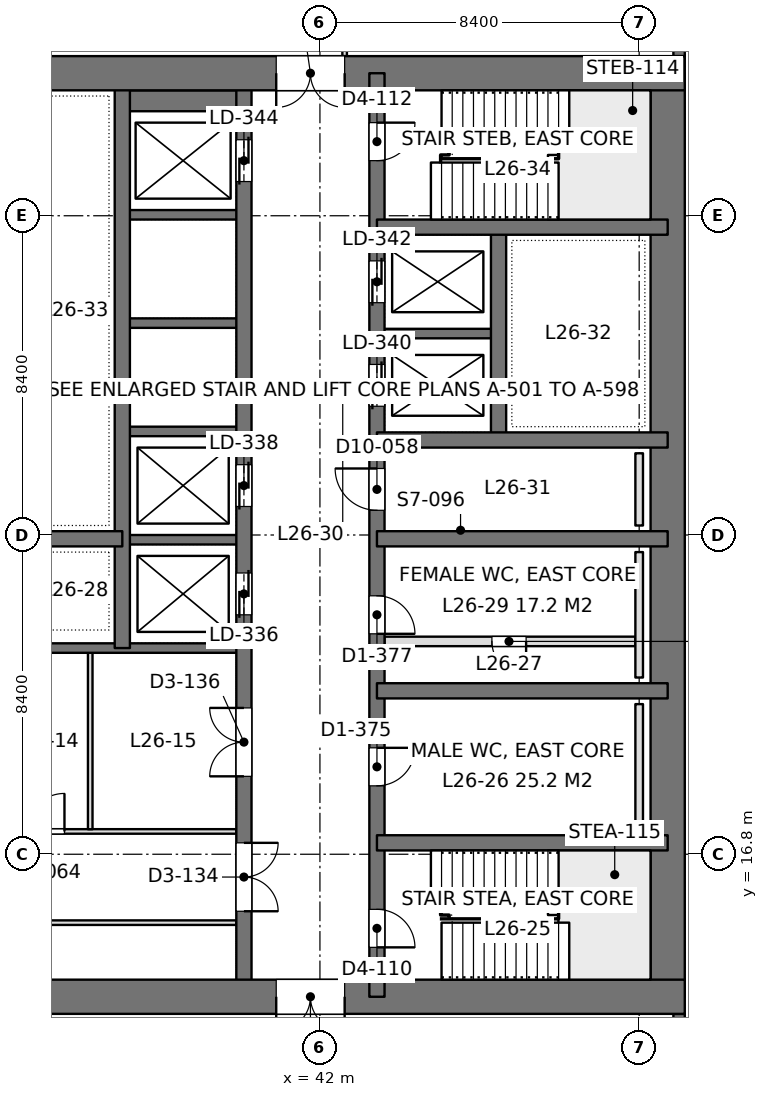
"""IFC4 building model, lengths in metres.
Left out: names, types, materials, properties, quantities, classifications, styles, units other than length and angle.
Written with IfcOpenShell. Run it as: python <this file> out.ifc"""

import sys

from ifc_helpers import new_model, si_unit, direction, frame, frame_2d, origin, place, context, subcontext, project, spatial, rectangle, extrude, element, fill, save


model = new_model("IFC4")
c1 = context("Model", 3, precision=1e-05, world=origin(), true_north=direction((0.0, 1.0)))
c2 = subcontext(c1, "Body", "Model", "MODEL_VIEW")
j1 = project(units=[si_unit("LENGTHUNIT", "METRE"), si_unit("PLANEANGLEUNIT", "RADIAN")], contexts=[c1])
p1 = place(None, origin())
s1 = spatial("IfcSite", under=j1, at=p1, CompositionType="ELEMENT")
p2 = place(p1, origin())
s2 = spatial("IfcBuilding", under=s1, at=p2, CompositionType="ELEMENT")
p3 = place(p2, frame((0.0, 0.0, 117.6)))
s3 = spatial("IfcBuildingStorey", under=s2, at=p3, CompositionType="ELEMENT", Elevation=117.6)
p4 = place(p3, frame((33.6, 13.05, 0.0), z_axis=(0.0, 0.0, 1.0), x_axis=(1.0, 0.0, 0.0)))
e1 = element("IfcWall", 1, at=p4, inside=s3, PredefinedType="SHEAR", context=c2, shape_type="SweptSolid", body=[
    extrude(rectangle(XDim=18.0, YDim=0.9, at=frame_2d((9.0, 0.0))), origin(), (0.0, 0.0, 1.0), 4.2),
])
p5 = place(p4, frame((7.25, 0.0, 0.0)))
e2 = element("IfcOpeningElement", 2, at=p5, cuts=e1, PredefinedType="OPENING", context=c2, shape_type="SweptSolid", body=[
    extrude(rectangle(XDim=1.8, YDim=2.4, at=frame_2d((0.9, 1.2))), frame((0.0, 0.46, 0.0), z_axis=(0.0, -1.0, 0.0), x_axis=(1.0, 0.0, 0.0)), (0.0, 0.0, 1.0), 0.92),
])
p6 = place(p3, frame((33.6, 37.35, 0.0), z_axis=(0.0, 0.0, 1.0), x_axis=(1.0, 0.0, 0.0)))
e3 = element("IfcWall", 3, at=p6, inside=s3, PredefinedType="SHEAR", context=c2, shape_type="SweptSolid", body=[
    extrude(rectangle(XDim=18.0, YDim=0.9, at=frame_2d((9.0, 0.0))), origin(), (0.0, 0.0, 1.0), 4.2),
])
p7 = place(p6, frame((7.25, 0.0, 0.0)))
e4 = element("IfcOpeningElement", 4, at=p7, cuts=e3, PredefinedType="OPENING", context=c2, shape_type="SweptSolid", body=[
    extrude(rectangle(XDim=1.8, YDim=2.4, at=frame_2d((0.9, 1.2))), frame((0.0, 0.46, 0.0), z_axis=(0.0, -1.0, 0.0), x_axis=(1.0, 0.0, 0.0)), (0.0, 0.0, 1.0), 0.92),
])
p8 = place(p3, frame((51.15, 13.05, 0.0), z_axis=(0.0, 0.0, 1.0), x_axis=(0.0, 1.0, 0.0)))
e5 = element("IfcWall", 5, at=p8, inside=s3, PredefinedType="SHEAR", context=c2, shape_type="SweptSolid", body=[
    extrude(rectangle(XDim=24.3, YDim=0.9, at=frame_2d((12.15, 0.0))), origin(), (0.0, 0.0, 1.0), 4.2),
])
p9 = place(p3, frame((43.5, 13.05, 0.0), z_axis=(0.0, 0.0, 1.0), x_axis=(0.0, 1.0, 0.0)))
e6 = element("IfcWall", 6, at=p9, inside=s3, PredefinedType="SHEAR", context=c2, shape_type="SweptSolid", body=[
    extrude(rectangle(XDim=24.3, YDim=0.4, at=frame_2d((12.15, 0.0))), origin(), (0.0, 0.0, 1.0), 4.2),
])
p10 = place(p9, frame((1.3, 0.0, 0.0)))
e7 = element("IfcOpeningElement", 7, at=p10, cuts=e6, PredefinedType="OPENING", context=c2, shape_type="SweptSolid", body=[
    extrude(rectangle(XDim=1.0, YDim=2.2, at=frame_2d((0.5, 1.1))), frame((0.0, 0.21, 0.0), z_axis=(0.0, -1.0, 0.0), x_axis=(1.0, 0.0, 0.0)), (0.0, 0.0, 1.0), 0.42),
])
p11 = place(p9, frame((22.0, 0.0, 0.0)))
e8 = element("IfcOpeningElement", 8, at=p11, cuts=e6, PredefinedType="OPENING", context=c2, shape_type="SweptSolid", body=[
    extrude(rectangle(XDim=1.0, YDim=2.2, at=frame_2d((0.5, 1.1))), frame((0.0, 0.21, 0.0), z_axis=(0.0, -1.0, 0.0), x_axis=(1.0, 0.0, 0.0)), (0.0, 0.0, 1.0), 0.42),
])
p12 = place(p9, frame((5.55, 0.0, 0.0)))
e9 = element("IfcOpeningElement", 9, at=p12, cuts=e6, PredefinedType="OPENING", context=c2, shape_type="SweptSolid", body=[
    extrude(rectangle(XDim=1.0, YDim=2.2, at=frame_2d((0.5, 1.1))), frame((0.0, 0.21, 0.0), z_axis=(0.0, -1.0, 0.0), x_axis=(1.0, 0.0, 0.0)), (0.0, 0.0, 1.0), 0.42),
])
p13 = place(p9, frame((9.55, 0.0, 0.0)))
e10 = element("IfcOpeningElement", 10, at=p13, cuts=e6, PredefinedType="OPENING", context=c2, shape_type="SweptSolid", body=[
    extrude(rectangle(XDim=1.0, YDim=2.2, at=frame_2d((0.5, 1.1))), frame((0.0, 0.21, 0.0), z_axis=(0.0, -1.0, 0.0), x_axis=(1.0, 0.0, 0.0)), (0.0, 0.0, 1.0), 0.42),
])
p14 = place(p9, frame((12.8, 0.0, 0.0)))
e11 = element("IfcOpeningElement", 11, at=p14, cuts=e6, PredefinedType="OPENING", context=c2, shape_type="SweptSolid", body=[
    extrude(rectangle(XDim=1.1, YDim=2.2, at=frame_2d((0.55, 1.1))), frame((0.0, 0.21, 0.0), z_axis=(0.0, -1.0, 0.0), x_axis=(1.0, 0.0, 0.0)), (0.0, 0.0, 1.0), 0.42),
])
p15 = place(p9, frame((15.538, 0.0, 0.0)))
e12 = element("IfcOpeningElement", 12, at=p15, cuts=e6, PredefinedType="OPENING", context=c2, shape_type="SweptSolid", body=[
    extrude(rectangle(XDim=1.1, YDim=2.2, at=frame_2d((0.55, 1.1))), frame((0.0, 0.21, 0.0), z_axis=(0.0, -1.0, 0.0), x_axis=(1.0, 0.0, 0.0)), (0.0, 0.0, 1.0), 0.42),
])
p16 = place(p9, frame((18.262, 0.0, 0.0)))
e13 = element("IfcOpeningElement", 13, at=p16, cuts=e6, PredefinedType="OPENING", context=c2, shape_type="SweptSolid", body=[
    extrude(rectangle(XDim=1.1, YDim=2.2, at=frame_2d((0.55, 1.1))), frame((0.0, 0.21, 0.0), z_axis=(0.0, -1.0, 0.0), x_axis=(1.0, 0.0, 0.0)), (0.0, 0.0, 1.0), 0.42),
])
p17 = place(p3, frame((40.0, 13.05, 0.0), z_axis=(0.0, 0.0, 1.0), x_axis=(0.0, 1.0, 0.0)))
e14 = element("IfcWall", 14, at=p17, inside=s3, PredefinedType="SHEAR", context=c2, shape_type="SweptSolid", body=[
    extrude(rectangle(XDim=24.3, YDim=0.4, at=frame_2d((12.15, 0.0))), origin(), (0.0, 0.0, 1.0), 4.2),
])
p18 = place(p17, frame((10.05, 0.0, 0.0)))
e15 = element("IfcOpeningElement", 15, at=p18, cuts=e14, PredefinedType="OPENING", context=c2, shape_type="SweptSolid", body=[
    extrude(rectangle(XDim=1.1, YDim=2.2, at=frame_2d((0.55, 1.1))), frame((0.0, 0.21, 0.0), z_axis=(0.0, -1.0, 0.0), x_axis=(1.0, 0.0, 0.0)), (0.0, 0.0, 1.0), 0.42),
])
p19 = place(p17, frame((12.9, 0.0, 0.0)))
e16 = element("IfcOpeningElement", 16, at=p19, cuts=e14, PredefinedType="OPENING", context=c2, shape_type="SweptSolid", body=[
    extrude(rectangle(XDim=1.1, YDim=2.2, at=frame_2d((0.55, 1.1))), frame((0.0, 0.21, 0.0), z_axis=(0.0, -1.0, 0.0), x_axis=(1.0, 0.0, 0.0)), (0.0, 0.0, 1.0), 0.42),
])
p20 = place(p17, frame((21.45, 0.0, 0.0)))
e17 = element("IfcOpeningElement", 17, at=p20, cuts=e14, PredefinedType="OPENING", context=c2, shape_type="SweptSolid", body=[
    extrude(rectangle(XDim=1.1, YDim=2.2, at=frame_2d((0.55, 1.1))), frame((0.0, 0.21, 0.0), z_axis=(0.0, -1.0, 0.0), x_axis=(1.0, 0.0, 0.0)), (0.0, 0.0, 1.0), 0.42),
])
p21 = place(p17, frame((2.25, 0.0, 0.0)))
e18 = element("IfcOpeningElement", 18, at=p21, cuts=e14, PredefinedType="OPENING", context=c2, shape_type="SweptSolid", body=[
    extrude(rectangle(XDim=1.8, YDim=2.4, at=frame_2d((0.9, 1.2))), frame((0.0, 0.21, 0.0), z_axis=(0.0, -1.0, 0.0), x_axis=(1.0, 0.0, 0.0)), (0.0, 0.0, 1.0), 0.42),
])
p22 = place(p17, frame((5.8, 0.0, 0.0)))
e19 = element("IfcOpeningElement", 19, at=p22, cuts=e14, PredefinedType="OPENING", context=c2, shape_type="SweptSolid", body=[
    extrude(rectangle(XDim=1.8, YDim=2.4, at=frame_2d((0.9, 1.2))), frame((0.0, 0.21, 0.0), z_axis=(0.0, -1.0, 0.0), x_axis=(1.0, 0.0, 0.0)), (0.0, 0.0, 1.0), 0.42),
])
p23 = place(p3, frame((36.8, 22.225, 0.0), z_axis=(0.0, 0.0, 1.0), x_axis=(0.0, 1.0, 0.0)))
e20 = element("IfcWall", 20, at=p23, inside=s3, PredefinedType="SHEAR", context=c2, shape_type="SweptSolid", body=[
    extrude(rectangle(XDim=15.125, YDim=0.4, at=frame_2d((7.562, 0.0))), origin(), (0.0, 0.0, 1.0), 4.2),
])
for number, where, z_axis, x_axis in (
    (21, (51.15, 17.1, 0.0), (0.0, 0.0, 1.0), (-1.0, 0.0, 0.0)),
    (22, (51.15, 21.1, 0.0), (0.0, 0.0, 1.0), (-1.0, 0.0, 0.0)),
    (23, (51.15, 25.1, 0.0), (0.0, 0.0, 1.0), (-1.0, 0.0, 0.0)),
    (24, (51.15, 27.7, 0.0), (0.0, 0.0, 1.0), (-1.0, 0.0, 0.0)),
    (25, (51.15, 33.3, 0.0), (0.0, 0.0, 1.0), (-1.0, 0.0, 0.0)),
):
    element("IfcWall", number, at=place(p3, frame(where, z_axis=z_axis, x_axis=x_axis)), inside=s3, PredefinedType="SHEAR", context=c2, shape_type="SweptSolid", body=[
        extrude(rectangle(XDim=7.65, YDim=0.4, at=frame_2d((3.825, 0.0))), origin(), (0.0, 0.0, 1.0), 4.2),
    ])
p24 = place(p3, frame((46.7, 27.7, 0.0), z_axis=(0.0, 0.0, 1.0), x_axis=(0.0, 1.0, 0.0)))
e26 = element("IfcWall", 26, at=p24, inside=s3, PredefinedType="SHEAR", context=c2, shape_type="SweptSolid", body=[
    extrude(rectangle(XDim=5.6, YDim=0.4, at=frame_2d((2.8, 0.0))), origin(), (0.0, 0.0, 1.0), 4.2),
])
p25 = place(p3, frame((46.7, 30.5, 0.0), z_axis=(0.0, 0.0, 1.0), x_axis=(-1.0, 0.0, 0.0)))
e27 = element("IfcWall", 27, at=p25, inside=s3, PredefinedType="SHEAR", context=c2, shape_type="SweptSolid", body=[
    extrude(rectangle(XDim=3.2, YDim=0.25, at=frame_2d((1.6, 0.0))), origin(), (0.0, 0.0, 1.0), 4.2),
])
p26 = place(p3, frame((36.8, 25.1, 0.0), z_axis=(0.0, 0.0, 1.0), x_axis=(-1.0, 0.0, 0.0)))
e28 = element("IfcWall", 28, at=p26, inside=s3, PredefinedType="SHEAR", context=c2, shape_type="SweptSolid", body=[
    extrude(rectangle(XDim=2.75, YDim=0.4, at=frame_2d((1.375, 0.0))), origin(), (0.0, 0.0, 1.0), 4.2),
])
p27 = place(p3, frame((40.0, 22.225, 0.0), z_axis=(0.0, 0.0, 1.0), x_axis=(-1.0, 0.0, 0.0)))
e29 = element("IfcWall", 29, at=p27, inside=s3, PredefinedType="SHEAR", context=c2, shape_type="SweptSolid", body=[
    extrude(rectangle(XDim=5.95, YDim=0.25, at=frame_2d((2.975, 0.0))), origin(), (0.0, 0.0, 1.0), 4.2),
])
for number, where, z_axis, x_axis in (
    (30, (40.0, 25.075, 0.0), (0.0, 0.0, 1.0), (-1.0, 0.0, 0.0)),
    (31, (40.0, 27.925, 0.0), (0.0, 0.0, 1.0), (-1.0, 0.0, 0.0)),
    (32, (40.0, 30.775, 0.0), (0.0, 0.0, 1.0), (-1.0, 0.0, 0.0)),
    (33, (40.0, 33.625, 0.0), (0.0, 0.0, 1.0), (-1.0, 0.0, 0.0)),
):
    element("IfcWall", number, at=place(p3, frame(where, z_axis=z_axis, x_axis=x_axis)), inside=s3, PredefinedType="SHEAR", context=c2, shape_type="SweptSolid", body=[
        extrude(rectangle(XDim=3.2, YDim=0.25, at=frame_2d((1.6, 0.0))), origin(), (0.0, 0.0, 1.0), 4.2),
    ])
p28 = place(p3, frame((40.0, 36.625, 0.0), z_axis=(0.0, 0.0, 1.0), x_axis=(-1.0, 0.0, 0.0)))
e34 = element("IfcWall", 34, at=p28, inside=s3, PredefinedType="SHEAR", context=c2, shape_type="SweptSolid", body=[
    extrude(rectangle(XDim=3.2, YDim=0.55, at=frame_2d((1.6, 0.0))), origin(), (0.0, 0.0, 1.0), 4.2),
])
p29 = place(p3, frame((51.45, 42.0, 0.0), z_axis=(0.0, 0.0, 1.0), x_axis=(0.0, -1.0, 0.0)))
e35 = element("IfcWall", 35, at=p29, inside=s3, PredefinedType="SOLIDWALL", context=c2, shape_type="SweptSolid", body=[
    extrude(rectangle(XDim=4.2, YDim=0.3, at=frame_2d((2.1, 0.0))), origin(), (0.0, 0.0, 1.0), 4.05),
])
p30 = place(p29, frame((0.9, 0.0, 0.9)))
e36 = element("IfcOpeningElement", 36, at=p30, cuts=e35, PredefinedType="OPENING", context=c2, shape_type="SweptSolid", body=[
    extrude(rectangle(XDim=2.4, YDim=1.9, at=frame_2d((1.2, 0.95))), frame((0.0, 0.16, 0.0), z_axis=(0.0, -1.0, 0.0), x_axis=(1.0, 0.0, 0.0)), (0.0, 0.0, 1.0), 0.32),
])
p31 = place(p3, frame((51.45, 12.6, 0.0), z_axis=(0.0, 0.0, 1.0), x_axis=(0.0, -1.0, 0.0)))
e37 = element("IfcWall", 37, at=p31, inside=s3, PredefinedType="SOLIDWALL", context=c2, shape_type="SweptSolid", body=[
    extrude(rectangle(XDim=4.2, YDim=0.3, at=frame_2d((2.1, 0.0))), origin(), (0.0, 0.0, 1.0), 4.05),
])
p32 = place(p31, frame((0.9, 0.0, 0.9)))
e38 = element("IfcOpeningElement", 38, at=p32, cuts=e37, PredefinedType="OPENING", context=c2, shape_type="SweptSolid", body=[
    extrude(rectangle(XDim=2.4, YDim=1.9, at=frame_2d((1.2, 0.95))), frame((0.0, 0.16, 0.0), z_axis=(0.0, -1.0, 0.0), x_axis=(1.0, 0.0, 0.0)), (0.0, 0.0, 1.0), 0.32),
])
p33 = place(p3, frame((33.898, 17.4, 0.0), z_axis=(0.0, 0.0, 1.0), x_axis=(1.0, 0.0, 0.0)))
e39 = element("IfcWall", 39, at=p33, inside=s3, PredefinedType="PARTITIONING", context=c2, shape_type="SweptSolid", body=[
    extrude(rectangle(XDim=5.904, YDim=0.12, at=frame_2d((2.952, 0.0))), origin(), (0.0, 0.0, 1.0), 3.55),
])
p34 = place(p33, frame((0.38, 0.0, 0.0)))
e40 = element("IfcOpeningElement", 40, at=p34, cuts=e39, PredefinedType="OPENING", context=c2, shape_type="SweptSolid", body=[
    extrude(rectangle(XDim=1.0, YDim=2.4, at=frame_2d((0.5, 1.2))), frame((0.0, 0.07, 0.0), z_axis=(0.0, -1.0, 0.0), x_axis=(1.0, 0.0, 0.0)), (0.0, 0.0, 1.0), 0.14),
])
p35 = place(p3, frame((35.956, 17.458, 0.0), z_axis=(0.0, 0.0, 1.0), x_axis=(0.0, 1.0, 0.0)))
e41 = element("IfcWall", 41, at=p35, inside=s3, PredefinedType="PARTITIONING", context=c2, shape_type="SweptSolid", body=[
    extrude(rectangle(XDim=4.644, YDim=0.12, at=frame_2d((2.322, 0.0))), origin(), (0.0, 0.0, 1.0), 3.6),
])
p36 = place(p3, frame((33.598, 15.0, 0.0), z_axis=(0.0, 0.0, 1.0), x_axis=(1.0, 0.0, 0.0)))
e42 = element("IfcWall", 42, at=p36, inside=s3, PredefinedType="PARTITIONING", context=c2, shape_type="SweptSolid", body=[
    extrude(rectangle(XDim=6.204, YDim=0.12, at=frame_2d((3.102, 0.0))), origin(), (0.0, 0.0, 1.0), 3.55),
])
p37 = place(p3, frame((42.65, 37.8, 0.0), z_axis=(0.0, 0.0, 1.0), x_axis=(0.0, 1.0, 0.0)))
e43 = element("IfcWall", 43, at=p37, inside=s3, PredefinedType="PARTITIONING", context=c2, shape_type="SweptSolid", body=[
    extrude(rectangle(XDim=2.0, YDim=0.12, at=frame_2d((1.0, 0.0))), origin(), (0.0, 0.0, 1.0), 4.05),
])
p38 = place(p3, frame((43.7, 22.4, 0.0), z_axis=(0.0, 0.0, 1.0), x_axis=(1.0, 0.0, 0.0)))
e44 = element("IfcWall", 44, at=p38, inside=s3, PredefinedType="PARTITIONING", context=c2, shape_type="SweptSolid", body=[
    extrude(rectangle(XDim=6.6, YDim=0.25, at=frame_2d((3.3, 0.0))), origin(), (0.0, 0.0, 1.0), 4.0),
])
p39 = place(p38, frame((2.825, 0.0, 0.0)))
e45 = element("IfcOpeningElement", 45, at=p39, cuts=e44, PredefinedType="OPENING", context=c2, shape_type="SweptSolid", body=[
    extrude(rectangle(XDim=0.9, YDim=2.2, at=frame_2d((0.45, 1.1))), frame((0.0, 0.135, 0.0), z_axis=(0.0, -1.0, 0.0), x_axis=(1.0, 0.0, 0.0)), (0.0, 0.0, 1.0), 0.27),
])
for number, where, z_axis, x_axis in (
    (46, (50.4, 17.45, 0.0), (0.0, 0.0, 1.0), (0.0, 1.0, 0.0)),
    (47, (50.4, 21.45, 0.0), (0.0, 0.0, 1.0), (0.0, 1.0, 0.0)),
):
    element("IfcWall", number, at=place(p3, frame(where, z_axis=z_axis, x_axis=x_axis)), inside=s3, PredefinedType="PLUMBINGWALL", context=c2, shape_type="SweptSolid", body=[
        extrude(rectangle(XDim=3.3, YDim=0.2, at=frame_2d((1.65, 0.0))), origin(), (0.0, 0.0, 1.0), 1.2),
    ])
p40 = place(p3, frame((50.4, 25.45, 0.0), z_axis=(0.0, 0.0, 1.0), x_axis=(0.0, 1.0, 0.0)))
e48 = element("IfcWall", 48, at=p40, inside=s3, PredefinedType="PLUMBINGWALL", context=c2, shape_type="SweptSolid", body=[
    extrude(rectangle(XDim=1.9, YDim=0.2, at=frame_2d((0.95, 0.0))), origin(), (0.0, 0.0, 1.0), 1.2),
])
p41 = place(p5, frame((1.8, 0.0, 0.0), z_axis=(0.0, 0.0, 1.0), x_axis=(-1.0, 0.0, 0.0)))
e49 = element("IfcDoor", 49, at=p41, inside=s3, OperationType="DOUBLE_DOOR_SINGLE_SWING", PredefinedType="DOOR", context=c2, shape_type="SweptSolid", body=[
    extrude(rectangle(XDim=1.8, YDim=2.4, at=frame_2d((0.9, 1.2))), frame((0.0, 0.025, 0.0), z_axis=(0.0, -1.0, 0.0), x_axis=(1.0, 0.0, 0.0)), (0.0, 0.0, 1.0), 0.05),
])
fill(e2, e49)
p42 = place(p7, frame((1.8, 0.0, 0.0), z_axis=(0.0, 0.0, 1.0), x_axis=(-1.0, 0.0, 0.0)))
e50 = element("IfcDoor", 50, at=p42, inside=s3, OperationType="DOUBLE_DOOR_SINGLE_SWING", PredefinedType="DOOR", context=c2, shape_type="SweptSolid", body=[
    extrude(rectangle(XDim=1.8, YDim=2.4, at=frame_2d((0.9, 1.2))), frame((0.0, 0.025, 0.0), z_axis=(0.0, -1.0, 0.0), x_axis=(1.0, 0.0, 0.0)), (0.0, 0.0, 1.0), 0.05),
])
fill(e4, e50)
p43 = place(p10, frame((1.0, 0.0, 0.0), z_axis=(0.0, 0.0, 1.0), x_axis=(-1.0, 0.0, 0.0)))
e51 = element("IfcDoor", 51, at=p43, inside=s3, OperationType="SINGLE_SWING_RIGHT", PredefinedType="DOOR", context=c2, shape_type="SweptSolid", body=[
    extrude(rectangle(XDim=1.0, YDim=2.2, at=frame_2d((0.5, 1.1))), frame((0.0, 0.025, 0.0), z_axis=(0.0, -1.0, 0.0), x_axis=(1.0, 0.0, 0.0)), (0.0, 0.0, 1.0), 0.05),
])
fill(e7, e51)
p44 = place(p11, frame((1.0, 0.0, 0.0), z_axis=(0.0, 0.0, 1.0), x_axis=(-1.0, 0.0, 0.0)))
e52 = element("IfcDoor", 52, at=p44, inside=s3, OperationType="SINGLE_SWING_LEFT", PredefinedType="DOOR", context=c2, shape_type="SweptSolid", body=[
    extrude(rectangle(XDim=1.0, YDim=2.2, at=frame_2d((0.5, 1.1))), frame((0.0, 0.025, 0.0), z_axis=(0.0, -1.0, 0.0), x_axis=(1.0, 0.0, 0.0)), (0.0, 0.0, 1.0), 0.05),
])
fill(e8, e52)
p45 = place(p12, frame((1.0, 0.0, 0.0), z_axis=(0.0, 0.0, 1.0), x_axis=(-1.0, 0.0, 0.0)))
e53 = element("IfcDoor", 53, at=p45, inside=s3, OperationType="SINGLE_SWING_LEFT", PredefinedType="DOOR", context=c2, shape_type="SweptSolid", body=[
    extrude(rectangle(XDim=1.0, YDim=2.2, at=frame_2d((0.5, 1.1))), frame((0.0, 0.025, 0.0), z_axis=(0.0, -1.0, 0.0), x_axis=(1.0, 0.0, 0.0)), (0.0, 0.0, 1.0), 0.05),
])
fill(e9, e53)
p46 = place(p13, frame((1.0, 0.0, 0.0), z_axis=(0.0, 0.0, 1.0), x_axis=(-1.0, 0.0, 0.0)))
e54 = element("IfcDoor", 54, at=p46, inside=s3, OperationType="SINGLE_SWING_RIGHT", PredefinedType="DOOR", context=c2, shape_type="SweptSolid", body=[
    extrude(rectangle(XDim=1.0, YDim=2.2, at=frame_2d((0.5, 1.1))), frame((0.0, 0.025, 0.0), z_axis=(0.0, -1.0, 0.0), x_axis=(1.0, 0.0, 0.0)), (0.0, 0.0, 1.0), 0.05),
])
fill(e10, e54)
p47 = place(p14, origin())
e55 = element("IfcDoor", 55, at=p47, inside=s3, OperationType="SINGLE_SWING_RIGHT", PredefinedType="DOOR", context=c2, shape_type="SweptSolid", body=[
    extrude(rectangle(XDim=1.1, YDim=2.2, at=frame_2d((0.55, 1.1))), frame((0.0, 0.025, 0.0), z_axis=(0.0, -1.0, 0.0), x_axis=(1.0, 0.0, 0.0)), (0.0, 0.0, 1.0), 0.05),
])
fill(e11, e55)
p48 = place(p18, origin())
e56 = element("IfcDoor", 56, at=p48, inside=s3, OperationType="DOUBLE_DOOR_SLIDING", PredefinedType="DOOR", context=c2, shape_type="SweptSolid", body=[
    extrude(rectangle(XDim=1.1, YDim=2.2, at=frame_2d((0.55, 1.1))), frame((0.0, 0.025, 0.0), z_axis=(0.0, -1.0, 0.0), x_axis=(1.0, 0.0, 0.0)), (0.0, 0.0, 1.0), 0.05),
])
fill(e15, e56)
p49 = place(p19, origin())
e57 = element("IfcDoor", 57, at=p49, inside=s3, OperationType="DOUBLE_DOOR_SLIDING", PredefinedType="DOOR", context=c2, shape_type="SweptSolid", body=[
    extrude(rectangle(XDim=1.1, YDim=2.2, at=frame_2d((0.55, 1.1))), frame((0.0, 0.025, 0.0), z_axis=(0.0, -1.0, 0.0), x_axis=(1.0, 0.0, 0.0)), (0.0, 0.0, 1.0), 0.05),
])
fill(e16, e57)
p50 = place(p20, origin())
e58 = element("IfcDoor", 58, at=p50, inside=s3, OperationType="DOUBLE_DOOR_SLIDING", PredefinedType="DOOR", context=c2, shape_type="SweptSolid", body=[
    extrude(rectangle(XDim=1.1, YDim=2.2, at=frame_2d((0.55, 1.1))), frame((0.0, 0.025, 0.0), z_axis=(0.0, -1.0, 0.0), x_axis=(1.0, 0.0, 0.0)), (0.0, 0.0, 1.0), 0.05),
])
fill(e17, e58)
p51 = place(p15, origin())
e59 = element("IfcDoor", 59, at=p51, inside=s3, OperationType="DOUBLE_DOOR_SLIDING", PredefinedType="DOOR", context=c2, shape_type="SweptSolid", body=[
    extrude(rectangle(XDim=1.1, YDim=2.2, at=frame_2d((0.55, 1.1))), frame((0.0, 0.025, 0.0), z_axis=(0.0, -1.0, 0.0), x_axis=(1.0, 0.0, 0.0)), (0.0, 0.0, 1.0), 0.05),
])
fill(e12, e59)
p52 = place(p16, origin())
e60 = element("IfcDoor", 60, at=p52, inside=s3, OperationType="DOUBLE_DOOR_SLIDING", PredefinedType="DOOR", context=c2, shape_type="SweptSolid", body=[
    extrude(rectangle(XDim=1.1, YDim=2.2, at=frame_2d((0.55, 1.1))), frame((0.0, 0.025, 0.0), z_axis=(0.0, -1.0, 0.0), x_axis=(1.0, 0.0, 0.0)), (0.0, 0.0, 1.0), 0.05),
])
fill(e13, e60)
p53 = place(p21, frame((1.8, 0.0, 0.0), z_axis=(0.0, 0.0, 1.0), x_axis=(-1.0, 0.0, 0.0)))
e61 = element("IfcDoor", 61, at=p53, inside=s3, OperationType="DOUBLE_DOOR_SINGLE_SWING", PredefinedType="DOOR", context=c2, shape_type="SweptSolid", body=[
    extrude(rectangle(XDim=1.8, YDim=2.4, at=frame_2d((0.9, 1.2))), frame((0.0, 0.025, 0.0), z_axis=(0.0, -1.0, 0.0), x_axis=(1.0, 0.0, 0.0)), (0.0, 0.0, 1.0), 0.05),
])
fill(e18, e61)
p54 = place(p22, origin())
e62 = element("IfcDoor", 62, at=p54, inside=s3, OperationType="DOUBLE_DOOR_SINGLE_SWING", PredefinedType="DOOR", context=c2, shape_type="SweptSolid", body=[
    extrude(rectangle(XDim=1.8, YDim=2.4, at=frame_2d((0.9, 1.2))), frame((0.0, 0.025, 0.0), z_axis=(0.0, -1.0, 0.0), x_axis=(1.0, 0.0, 0.0)), (0.0, 0.0, 1.0), 0.05),
])
fill(e19, e62)
p55 = place(p34, origin())
e63 = element("IfcDoor", 63, at=p55, inside=s3, OperationType="SINGLE_SWING_RIGHT", PredefinedType="DOOR", context=c2, shape_type="SweptSolid", body=[
    extrude(rectangle(XDim=1.0, YDim=2.4, at=frame_2d((0.5, 1.2))), frame((0.0, 0.025, 0.0), z_axis=(0.0, -1.0, 0.0), x_axis=(1.0, 0.0, 0.0)), (0.0, 0.0, 1.0), 0.05),
])
fill(e40, e63)
p56 = place(p39, frame((0.9, 0.0, 0.0), z_axis=(0.0, 0.0, 1.0), x_axis=(-1.0, 0.0, 0.0)))
e64 = element("IfcDoor", 64, at=p56, inside=s3, OperationType="SINGLE_SWING_LEFT", PredefinedType="DOOR", context=c2, shape_type="SweptSolid", body=[
    extrude(rectangle(XDim=0.9, YDim=2.2, at=frame_2d((0.45, 1.1))), frame((0.0, 0.025, 0.0), z_axis=(0.0, -1.0, 0.0), x_axis=(1.0, 0.0, 0.0)), (0.0, 0.0, 1.0), 0.05),
])
fill(e45, e64)
save(model, sys.argv[1])
